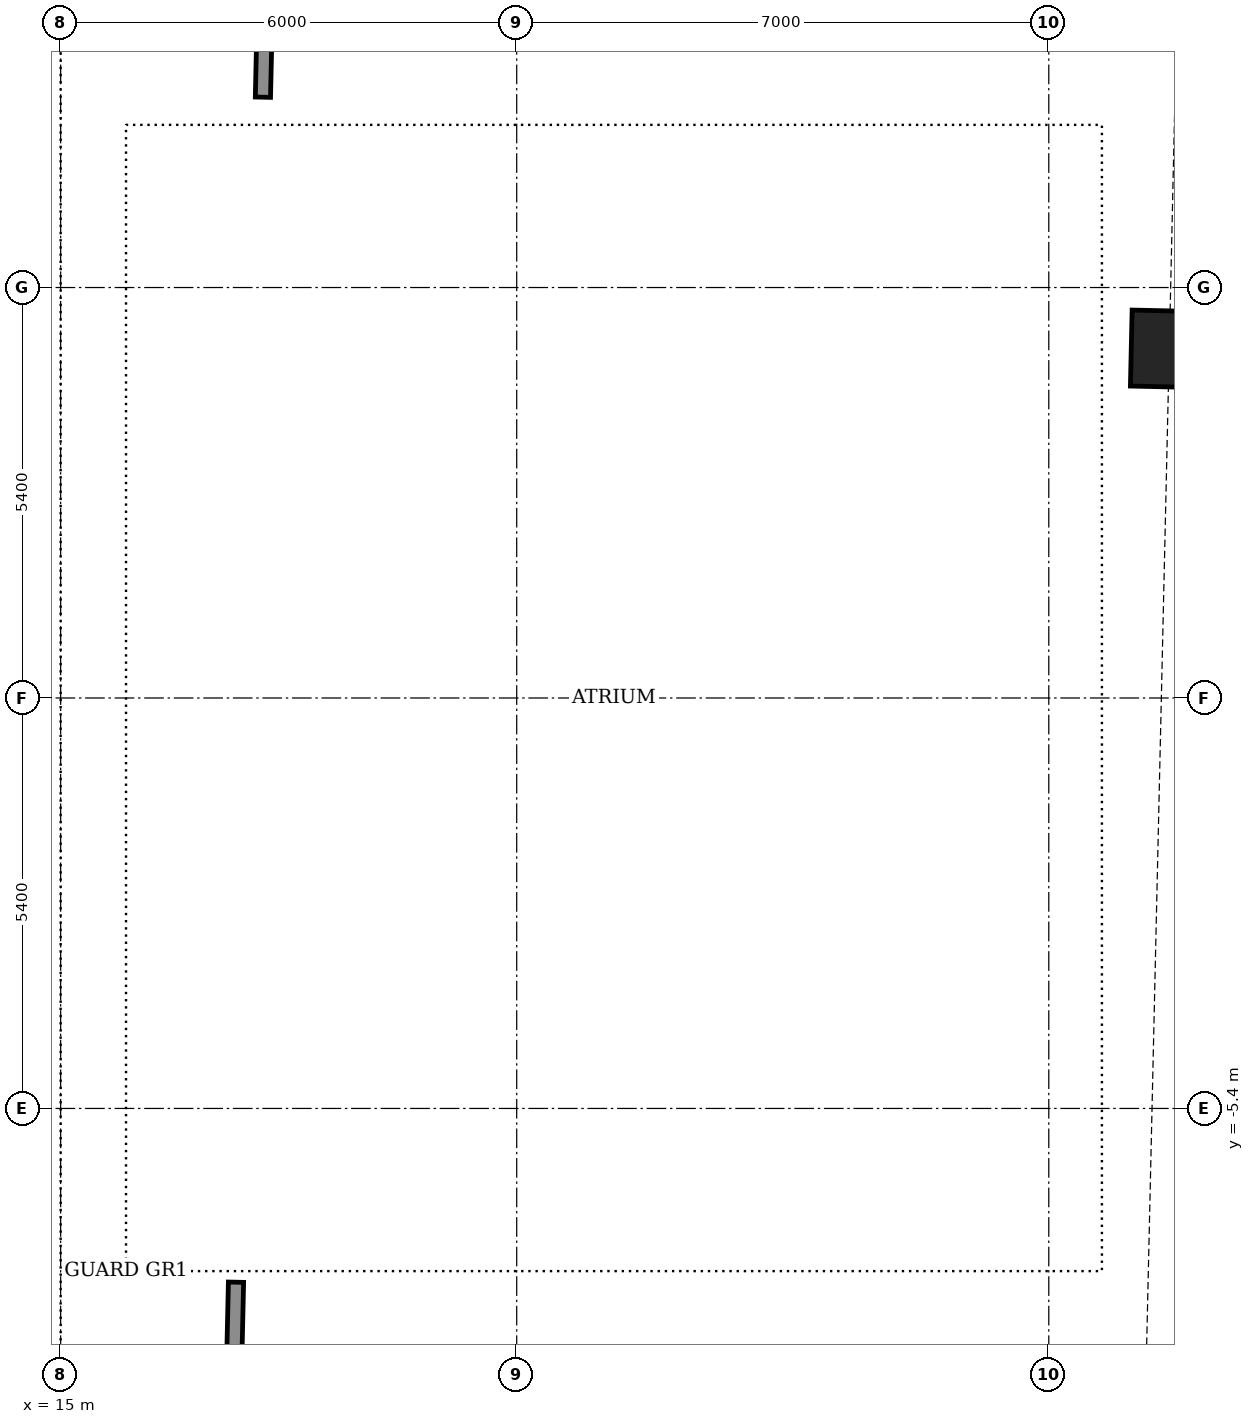
"""IFC4 building model, lengths in metres.
Left out: names, types, materials, properties, quantities, classifications, styles, units other than length and angle.
Written with IfcOpenShell. Run it as: python <this file> out.ifc"""

import sys

from ifc_helpers import new_model, si_unit, direction, frame, frame_2d, origin, origin_2d, place, context, subcontext, project, spatial, rectangle, extrude, element, save


model = new_model("IFC4")
c1 = context("Model", 3, precision=1e-05, world=origin(), true_north=direction((0.0, 1.0)))
c2 = subcontext(c1, "Body", "Model", "MODEL_VIEW")
j1 = project(units=[si_unit("LENGTHUNIT", "METRE"), si_unit("PLANEANGLEUNIT", "RADIAN")], contexts=[c1])
p1 = place(None, origin())
s1 = spatial("IfcSite", under=j1, at=p1, CompositionType="ELEMENT")
p2 = place(p1, origin())
s2 = spatial("IfcBuilding", under=s1, at=p2, CompositionType="ELEMENT")
p3 = place(p2, frame((0.0, 0.0, 257.3)))
s3 = spatial("IfcBuildingStorey", under=s2, at=p3, CompositionType="ELEMENT", Elevation=257.3)
p4 = place(p3, frame((29.585, 4.592, -0.55), z_axis=(0.0, 0.0, 1.0), x_axis=(0.022659642318, 0.999743237341, 0.0)))
e1 = element("IfcColumn", 1, at=p4, inside=s3, PredefinedType="COLUMN", context=c2, shape_type="SweptSolid", body=[
    extrude(rectangle(XDim=1.0, YDim=1.0, at=origin_2d()), origin(), (0.0, 0.0, 1.0), 3.6),
])
p5 = place(p3, frame((17.18, -13.306, 0.0), z_axis=(0.0, 0.0, 1.0), x_axis=(0.022584272568, 0.999744942789, 0.0)))
e2 = element("IfcWall", 2, at=p5, inside=s3, PredefinedType="PARTITIONING", context=c2, shape_type="SweptSolid", body=[
    extrude(rectangle(XDim=5.621, YDim=0.2, at=frame_2d((2.811, 0.0))), origin(), (0.0, 0.0, 1.0), 3.05),
])
p6 = place(p3, frame((17.661, 7.904, 0.0), z_axis=(0.0, 0.0, 1.0), x_axis=(0.022718785711, 0.999741895079, 0.0)))
e3 = element("IfcWall", 3, at=p6, inside=s3, PredefinedType="PARTITIONING", context=c2, shape_type="SweptSolid", body=[
    extrude(rectangle(XDim=4.234, YDim=0.2, at=frame_2d((2.117, 0.0))), origin(), (0.0, 0.0, 1.0), 3.05),
])
save(model, sys.argv[1])
